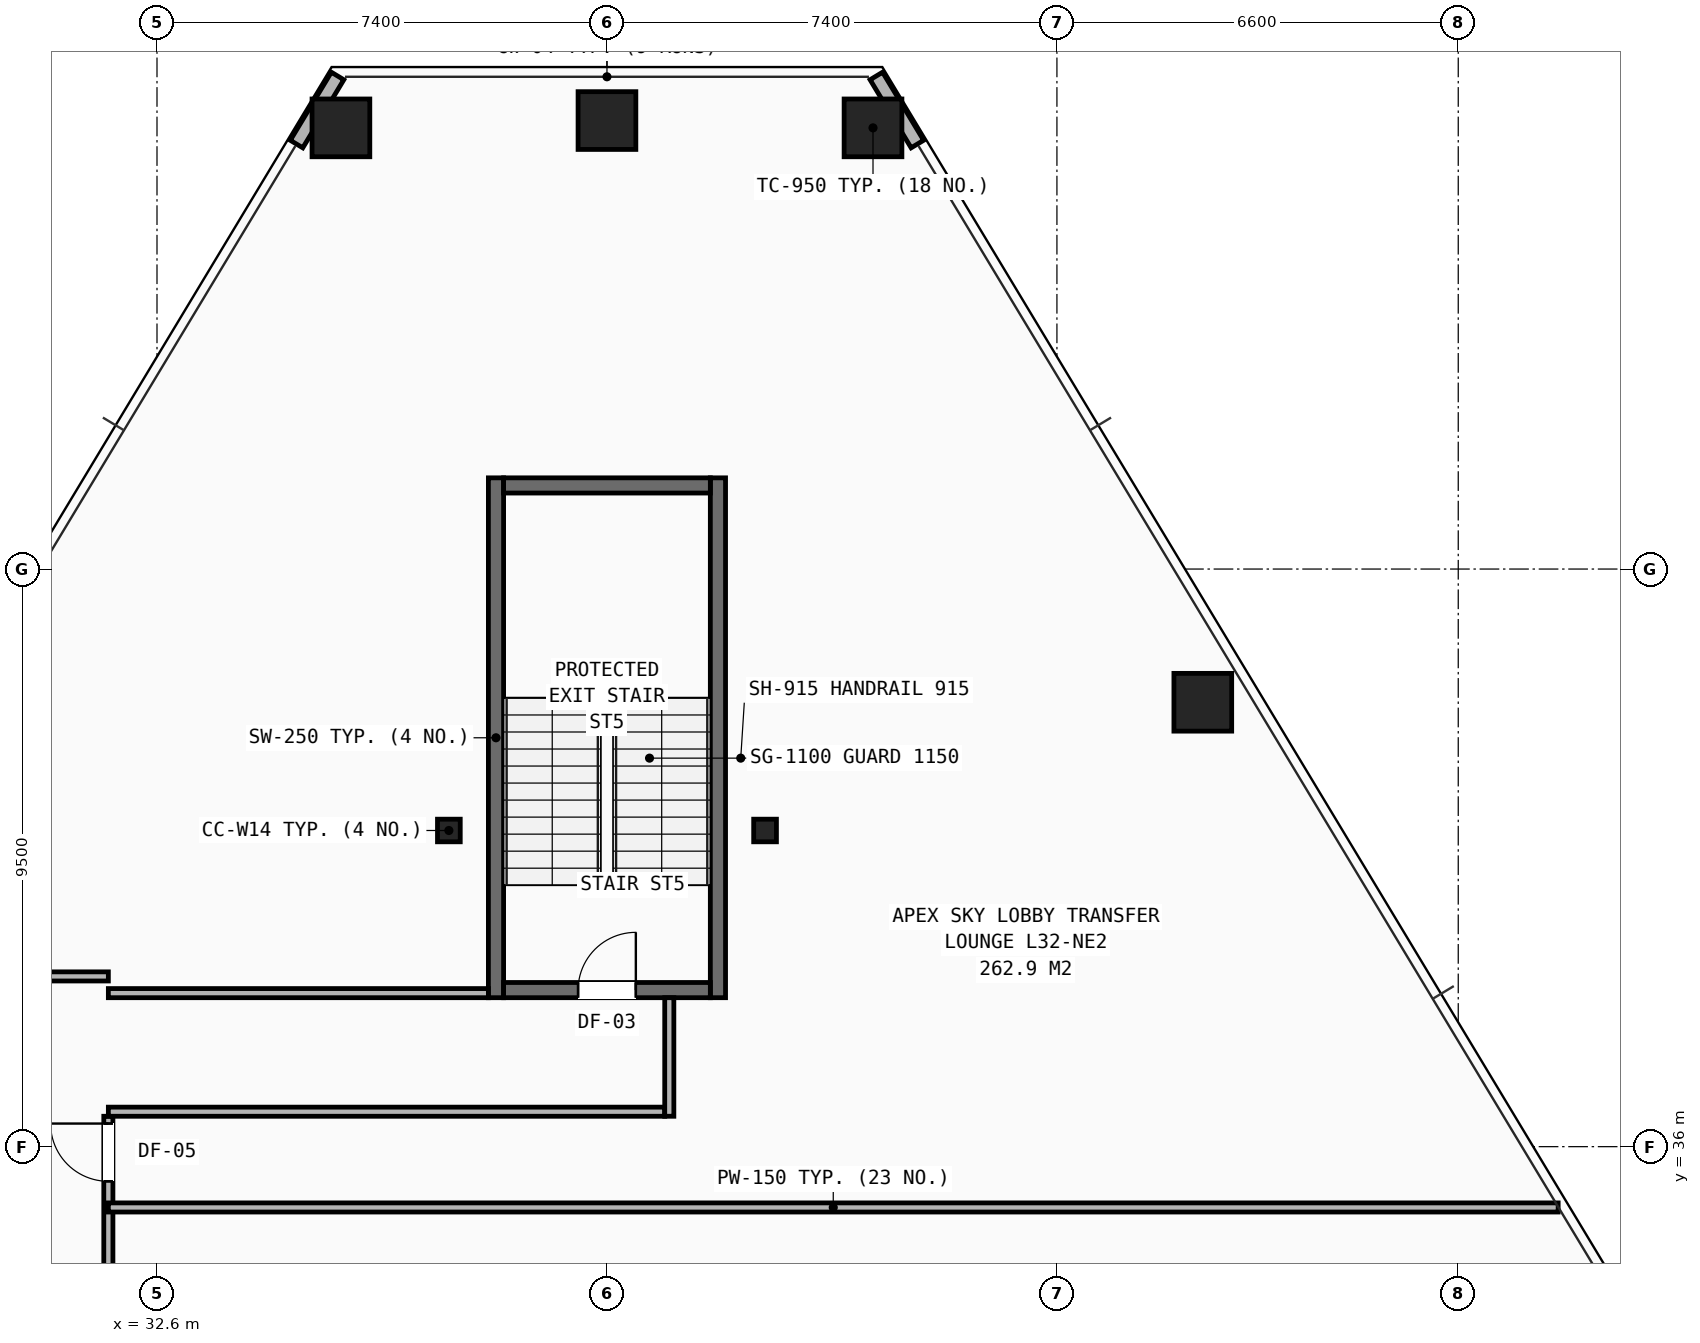
"""IFC4 building model, lengths in metres.
Left out: names, types, materials, properties, quantities, classifications, styles, units other than length and angle.
Written with IfcOpenShell. Run it as: python <this file> out.ifc"""

import sys

from ifc_helpers import new_model, si_unit, direction, frame, frame_2d, origin, origin_2d, place, context, subcontext, project, spatial, rectangle, hollow_rectangle, i_section, extrude, element, fill, save


model = new_model("IFC4")
c1 = context("Model", 3, precision=1e-05, world=origin(), true_north=direction((0.0, 1.0)))
c2 = subcontext(c1, "Body", "Model", "MODEL_VIEW")
j1 = project(units=[si_unit("LENGTHUNIT", "METRE"), si_unit("PLANEANGLEUNIT", "RADIAN")], contexts=[c1])
p1 = place(None, origin())
s1 = spatial("IfcSite", under=j1, at=p1, CompositionType="ELEMENT")
p2 = place(p1, origin())
s2 = spatial("IfcBuilding", under=s1, at=p2, CompositionType="ELEMENT")
p3 = place(p2, frame((0.0, 0.0, 111.8)))
s3 = spatial("IfcBuildingStorey", under=s2, at=p3, CompositionType="ELEMENT", Elevation=111.8)
for number, where, z_axis, x_axis in (
    (1, (37.4, 41.2, 0.0), (0.0, 0.0, 1.0), (1.0, 0.0, 0.0)),
    (2, (42.6, 41.2, 0.0), (0.0, 0.0, 1.0), (1.0, 0.0, 0.0)),
):
    element("IfcColumn", number, at=place(p3, frame(where, z_axis=z_axis, x_axis=x_axis)), inside=s3, PredefinedType="COLUMN", context=c2, shape_type="SweptSolid", body=[
        extrude(i_section(OverallWidth=0.374, OverallDepth=0.372, WebThickness=0.016, FlangeThickness=0.026, at=origin_2d()), origin(), (0.0, 0.0, 1.0), 4.2),
    ])
for number, where, z_axis, x_axis in (
    (3, (44.375, 52.756, 0.0), (0.0, 0.0, 1.0), (1.0, 0.0, 0.0)),
    (4, (40.0, 52.876, 0.0), (0.0, 0.0, 1.0), (1.0, 0.0, 0.0)),
    (5, (35.625, 52.756, 0.0), (0.0, 0.0, 1.0), (1.0, 0.0, 0.0)),
    (6, (49.799, 43.309, 0.0), (0.0, 0.0, 1.0), (1.0, 0.0, 0.0)),
):
    element("IfcColumn", number, at=place(p3, frame(where, z_axis=z_axis, x_axis=x_axis)), inside=s3, PredefinedType="COLUMN", context=c2, shape_type="SweptSolid", body=[
        extrude(hollow_rectangle(XDim=0.95, YDim=0.95, WallThickness=0.065, at=origin_2d()), origin(), (0.0, 0.0, 1.0), 4.2),
    ])
for number, where, z_axis, x_axis in (
    (7, (35.57, 53.61, 0.0), (0.0, 0.0, 1.0), (-0.516, -0.857, 0.0)),
    (8, (45.105, 52.49, 0.0), (0.0, 0.0, 1.0), (-0.516, 0.857, 0.0)),
):
    element("IfcWall", number, at=place(p3, frame(where, z_axis=z_axis, x_axis=x_axis)), inside=s3, PredefinedType="SHEAR", context=c2, shape_type="SweptSolid", body=[
        extrude(rectangle(XDim=1.307, YDim=0.24, at=frame_2d((0.654, 0.0))), origin(), (0.0, 0.0, 1.0), 3.243),
    ])
p4 = place(p3, frame((31.8, 31.2, 0.0), z_axis=(0.0, 0.0, 1.0), x_axis=(0.0, 1.0, 0.0)))
e9 = element("IfcWall", 9, at=p4, inside=s3, PredefinedType="PARTITIONING", context=c2, shape_type="SweptSolid", body=[
    extrude(rectangle(XDim=5.3, YDim=0.15, at=frame_2d((2.65, 0.0))), origin(), (0.0, 0.0, 1.0), 2.975),
])
p5 = place(p4, frame((0.5, 0.0, 0.0)))
e10 = element("IfcOpeningElement", 10, at=p5, cuts=e9, PredefinedType="OPENING", context=c2, shape_type="SweptSolid", body=[
    extrude(rectangle(XDim=0.95, YDim=2.1, at=frame_2d((0.475, 1.05))), frame((0.0, 0.085, 0.0), z_axis=(0.0, -1.0, 0.0), x_axis=(1.0, 0.0, 0.0)), (0.0, 0.0, 1.0), 0.17),
])
p6 = place(p4, frame((4.23, 0.0, 0.0)))
e11 = element("IfcOpeningElement", 11, at=p6, cuts=e9, PredefinedType="OPENING", context=c2, shape_type="SweptSolid", body=[
    extrude(rectangle(XDim=0.95, YDim=2.1, at=frame_2d((0.475, 1.05))), frame((0.0, 0.085, 0.0), z_axis=(0.0, -1.0, 0.0), x_axis=(1.0, 0.0, 0.0)), (0.0, 0.0, 1.0), 0.17),
])
p7 = place(p3, frame((29.6, 38.8, 0.0), z_axis=(0.0, 0.0, 1.0), x_axis=(1.0, 0.0, 0.0)))
e12 = element("IfcWall", 12, at=p7, inside=s3, PredefinedType="PARTITIONING", context=c2, shape_type="SweptSolid", body=[
    extrude(rectangle(XDim=2.2, YDim=0.15, at=frame_2d((1.1, 0.0))), origin(), (0.0, 0.0, 1.0), 3.493),
])
p8 = place(p3, frame((31.8, 35.0, 0.0), z_axis=(0.0, 0.0, 1.0), x_axis=(1.0, 0.0, 0.0)))
e13 = element("IfcWall", 13, at=p8, inside=s3, PredefinedType="PARTITIONING", context=c2, shape_type="SweptSolid", body=[
    extrude(rectangle(XDim=23.843, YDim=0.15, at=frame_2d((11.922, 0.0))), origin(), (0.0, 0.0, 1.0), 3.248),
])
for number, where, z_axis, x_axis in (
    (14, (38.175, 38.45, 0.0), (0.0, 0.0, 1.0), (0.0, 1.0, 0.0)),
    (15, (41.825, 38.45, 0.0), (0.0, 0.0, 1.0), (0.0, 1.0, 0.0)),
):
    element("IfcWall", number, at=place(p3, frame(where, z_axis=z_axis, x_axis=x_axis)), inside=s3, PredefinedType="SHEAR", context=c2, shape_type="SweptSolid", body=[
        extrude(rectangle(XDim=8.55, YDim=0.25, at=frame_2d((4.275, 0.0))), origin(), (0.0, 0.0, 1.0), 3.96),
    ])
p9 = place(p3, frame((38.3, 38.575, 0.0), z_axis=(0.0, 0.0, 1.0), x_axis=(1.0, 0.0, 0.0)))
e16 = element("IfcWall", 16, at=p9, inside=s3, PredefinedType="SHEAR", context=c2, shape_type="SweptSolid", body=[
    extrude(rectangle(XDim=3.4, YDim=0.25, at=frame_2d((1.7, 0.0))), origin(), (0.0, 0.0, 1.0), 3.96),
])
p10 = place(p9, frame((1.225, 0.0, 0.0)))
e17 = element("IfcOpeningElement", 17, at=p10, cuts=e16, PredefinedType="OPENING", context=c2, shape_type="SweptSolid", body=[
    extrude(rectangle(XDim=0.95, YDim=2.1, at=frame_2d((0.475, 1.05))), frame((0.0, 0.135, 0.0), z_axis=(0.0, -1.0, 0.0), x_axis=(1.0, 0.0, 0.0)), (0.0, 0.0, 1.0), 0.27),
])
p11 = place(p3, frame((38.3, 46.875, 0.0), z_axis=(0.0, 0.0, 1.0), x_axis=(1.0, 0.0, 0.0)))
e18 = element("IfcWall", 18, at=p11, inside=s3, PredefinedType="SHEAR", context=c2, shape_type="SweptSolid", body=[
    extrude(rectangle(XDim=3.4, YDim=0.25, at=frame_2d((1.7, 0.0))), origin(), (0.0, 0.0, 1.0), 3.96),
])
p12 = place(p3, frame((31.8, 36.575, 0.0), z_axis=(0.0, 0.0, 1.0), x_axis=(1.0, 0.0, 0.0)))
e19 = element("IfcWall", 19, at=p12, inside=s3, PredefinedType="PARTITIONING", context=c2, shape_type="SweptSolid", body=[
    extrude(rectangle(XDim=9.15, YDim=0.15, at=frame_2d((4.575, 0.0))), origin(), (0.0, 0.0, 1.0), 3.96),
])
p13 = place(p3, frame((31.8, 38.525, 0.0), z_axis=(0.0, 0.0, 1.0), x_axis=(1.0, 0.0, 0.0)))
e20 = element("IfcWall", 20, at=p13, inside=s3, PredefinedType="PARTITIONING", context=c2, shape_type="SweptSolid", body=[
    extrude(rectangle(XDim=6.25, YDim=0.15, at=frame_2d((3.125, 0.0))), origin(), (0.0, 0.0, 1.0), 3.96),
])
p14 = place(p3, frame((41.025, 36.5, 0.0), z_axis=(0.0, 0.0, 1.0), x_axis=(0.0, 1.0, 0.0)))
e21 = element("IfcWall", 21, at=p14, inside=s3, PredefinedType="PARTITIONING", context=c2, shape_type="SweptSolid", body=[
    extrude(rectangle(XDim=1.95, YDim=0.15, at=frame_2d((0.975, 0.0))), origin(), (0.0, 0.0, 1.0), 3.96),
])
p15 = place(p6, origin())
e22 = element("IfcDoor", 22, at=p15, inside=s3, OperationType="SINGLE_SWING_RIGHT", PredefinedType="DOOR", context=c2, shape_type="SweptSolid", body=[
    extrude(rectangle(XDim=0.95, YDim=2.1, at=frame_2d((0.475, 1.05))), frame((0.0, 0.025, 0.0), z_axis=(0.0, -1.0, 0.0), x_axis=(1.0, 0.0, 0.0)), (0.0, 0.0, 1.0), 0.05),
])
fill(e11, e22)
p16 = place(p10, origin())
e23 = element("IfcDoor", 23, at=p16, inside=s3, OperationType="SINGLE_SWING_RIGHT", PredefinedType="DOOR", context=c2, shape_type="SweptSolid", body=[
    extrude(rectangle(XDim=0.95, YDim=2.1, at=frame_2d((0.475, 1.05))), frame((0.0, 0.025, 0.0), z_axis=(0.0, -1.0, 0.0), x_axis=(1.0, 0.0, 0.0)), (0.0, 0.0, 1.0), 0.05),
])
fill(e17, e23)
save(model, sys.argv[1])
